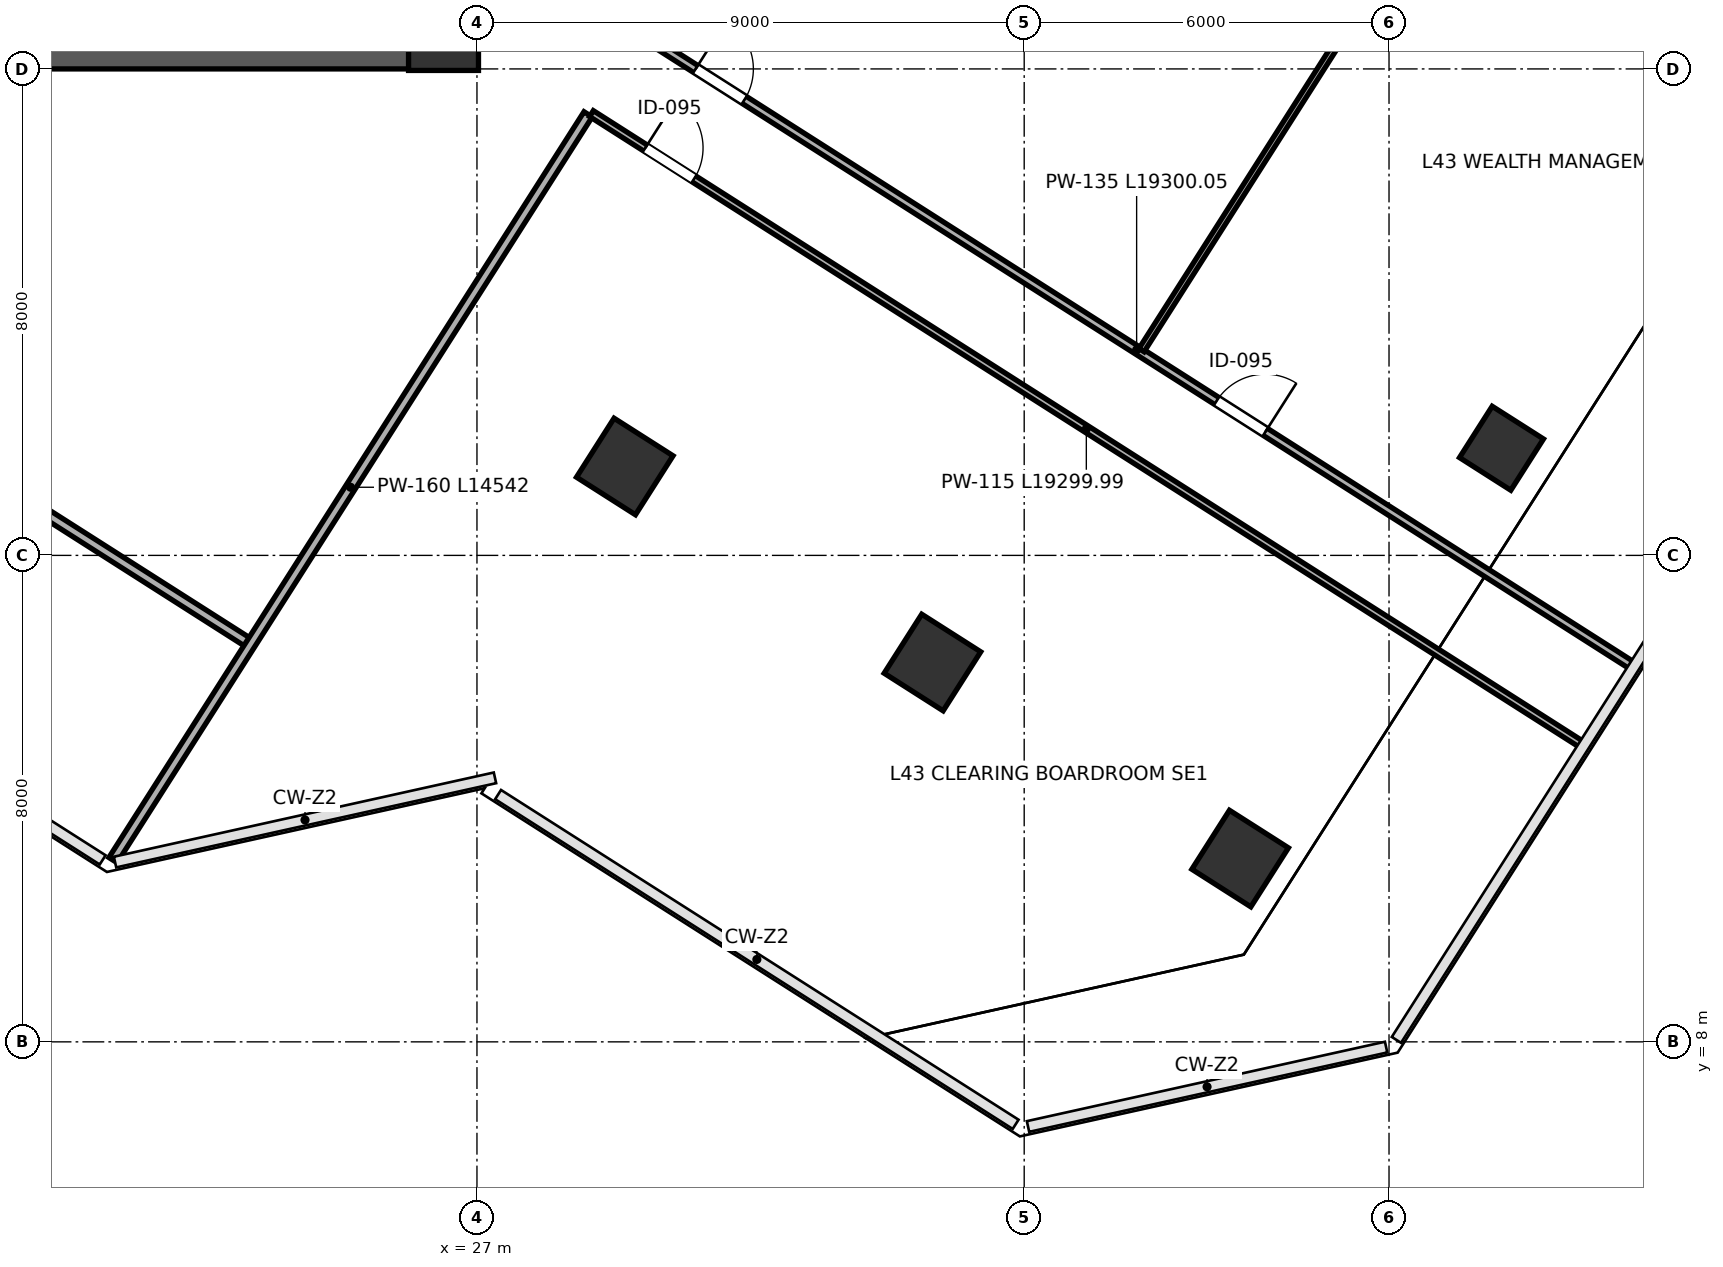
"""IFC4 building model, lengths in metres.
Left out: names, types, materials, properties, quantities, classifications, styles, units other than length and angle.
Written with IfcOpenShell. Run it as: python <this file> out.ifc"""

import sys

from ifc_helpers import new_model, si_unit, direction, frame, frame_2d, origin, origin_2d, place, context, subcontext, project, spatial, rectangle, extrude, clip, halfspace, source, transform, mapped, element, fill, save


model = new_model("IFC4")
c1 = context("Model", 3, precision=1e-05, world=origin(), true_north=direction((0.0, 1.0)))
c2 = subcontext(c1, "Body", "Model", "MODEL_VIEW")
j1 = project(units=[si_unit("LENGTHUNIT", "METRE"), si_unit("PLANEANGLEUNIT", "RADIAN")], contexts=[c1])
p1 = place(None, origin())
s1 = spatial("IfcSite", under=j1, at=p1, CompositionType="ELEMENT")
p2 = place(p1, origin())
s2 = spatial("IfcBuilding", under=s1, at=p2, CompositionType="ELEMENT")
p3 = place(p2, frame((0.0, 0.0, 191.8)))
s3 = spatial("IfcBuildingStorey", under=s2, at=p3, CompositionType="ELEMENT", Elevation=191.8)
m1 = source(origin(), c2, "Body", "SweptSolid", [
    extrude(rectangle(XDim=1.15, YDim=1.15, at=origin_2d()), origin(), (0.0, 0.0, 1.0), 4.198),
])
p4 = place(p3, frame((26.45, 24.55, 0.001), z_axis=(0.0, 0.0, 1.0), x_axis=(1.0, 0.0, 0.0)))
e1 = element("IfcColumn", 1, at=p4, inside=s3, PredefinedType="COLUMN", context=c2, shape_type="MappedRepresentation", body=[
    mapped(m1, transform((0.0, 0.0, 0.0), scale=1.0)),
])
p5 = place(p3, frame((29.431, 17.462, 0.0), z_axis=(-0.150609091116, -0.077911131198, 0.985518522053), x_axis=(0.082803161903, 0.992392481711, 0.091108718698)))
e2 = element("IfcColumn", 2, at=p5, inside=s3, PredefinedType="COLUMN", context=c2, shape_type="Clipping", body=[
    clip(clip(extrude(rectangle(XDim=1.15, YDim=1.15, at=origin_2d()), origin(), (0.0, 0.0, 1.0), 4.262), halfspace(frame((0.0, 0.0, 0.137), z_axis=(0.0, 0.0, -1.0), x_axis=(1.0, 0.0, 0.0)), False)), halfspace(frame((0.0, 0.0, 4.125), z_axis=(0.0, 0.0, 1.0), x_axis=(1.0, 0.0, 0.0)), False)),
])
p6 = place(p3, frame((34.491, 14.238, 0.0), z_axis=(-0.182696206841, -0.127615340511, 0.974851999471), x_axis=(-0.053558466448, 0.991359707094, 0.119738973699)))
e3 = element("IfcColumn", 3, at=p6, inside=s3, PredefinedType="COLUMN", context=c2, shape_type="Clipping", body=[
    clip(clip(extrude(rectangle(XDim=1.15, YDim=1.15, at=origin_2d()), origin(), (0.0, 0.0, 1.0), 4.308), halfspace(frame((0.0, 0.0, 0.182), z_axis=(0.0, 0.0, -1.0), x_axis=(1.0, 0.0, 0.0)), False)), halfspace(frame((0.0, 0.0, 4.126), z_axis=(0.0, 0.0, 1.0), x_axis=(1.0, 0.0, 0.0)), False)),
])
p7 = place(p3, frame((39.552, 11.014, 0.0), z_axis=(-0.213406469834, -0.175585480285, 0.961055366639), x_axis=(-0.137104351664, 0.979364247666, 0.148485915657)))
e4 = element("IfcColumn", 4, at=p7, inside=s3, PredefinedType="COLUMN", context=c2, shape_type="Clipping", body=[
    clip(clip(extrude(rectangle(XDim=1.15, YDim=1.15, at=origin_2d()), origin(), (0.0, 0.0, 1.0), 4.37), halfspace(frame((0.0, 0.0, 0.229), z_axis=(0.0, 0.0, -1.0), x_axis=(1.0, 0.0, 0.0)), False)), halfspace(frame((0.0, 0.0, 4.141), z_axis=(0.0, 0.0, 1.0), x_axis=(1.0, 0.0, 0.0)), False)),
])
p8 = place(p3, frame((43.85, 17.762, 0.0), z_axis=(-0.147452651765, -0.22070260078, 0.964130736724), x_axis=(-0.413499326518, 0.899266078661, 0.142614258542)))
e5 = element("IfcColumn", 5, at=p8, inside=s3, PredefinedType="COLUMN", context=c2, shape_type="Clipping", body=[
    clip(clip(extrude(rectangle(XDim=1.0, YDim=1.0, at=origin_2d()), origin(), (0.0, 0.0, 1.0), 4.356), halfspace(frame((0.0, 0.0, 0.191), z_axis=(0.0, 0.0, -1.0), x_axis=(1.0, 0.0, 0.0)), False)), halfspace(frame((0.0, 0.0, 4.165), z_axis=(0.0, 0.0, 1.0), x_axis=(1.0, 0.0, 0.0)), False)),
])
p9 = place(p3, frame((9.0, 24.225, 0.0), z_axis=(0.0, 0.0, 1.0), x_axis=(1.0, 0.0, 0.0)))
e6 = element("IfcWall", 6, at=p9, inside=s3, PredefinedType="SHEAR", context=c2, shape_type="SweptSolid", body=[
    extrude(rectangle(XDim=18.0, YDim=0.45, at=frame_2d((9.0, 0.0))), origin(), (0.0, 0.0, 1.0), 3.96),
])
p10 = place(p3, frame((6.25, 25.389, 0.0), z_axis=(0.0, 0.0, 1.0), x_axis=(0.843390478307, -0.537301127024, 0.0)))
e7 = element("IfcWall", 7, at=p10, inside=s3, PredefinedType="PARTITIONING", context=c2, shape_type="SweptSolid", body=[
    extrude(rectangle(XDim=20.15, YDim=0.16, at=frame_2d((10.075, 0.0))), origin(), (0.0, 0.0, 1.0), 3.96),
])
p11 = place(p10, frame((0.65, 0.0, 0.0)))
e8 = element("IfcOpeningElement", 8, at=p11, cuts=e7, PredefinedType="OPENING", context=c2, shape_type="SweptSolid", body=[
    extrude(rectangle(XDim=0.95, YDim=2.15, at=frame_2d((0.475, 1.075))), frame((0.0, 0.09, 0.0), z_axis=(0.0, -1.0, 0.0), x_axis=(1.0, 0.0, 0.0)), (0.0, 0.0, 1.0), 0.18),
])
p12 = place(p3, frame((21.014, 10.988, 0.0), z_axis=(0.0, 0.0, 1.0), x_axis=(0.537301260837, 0.843390393058, 0.0)))
e9 = element("IfcWall", 9, at=p12, inside=s3, PredefinedType="PARTITIONING", context=c2, shape_type="SweptSolid", body=[
    extrude(rectangle(XDim=14.542, YDim=0.16, at=frame_2d((7.271, 0.0))), origin(), (0.0, 0.0, 1.0), 3.96),
])
p13 = place(p3, frame((29.71, 24.564, 0.0), z_axis=(0.0, 0.0, 1.0), x_axis=(0.843390003721, -0.537301871971, 0.0)))
e10 = element("IfcWall", 10, at=p13, inside=s3, PredefinedType="PARTITIONING", context=c2, shape_type="SweptSolid", body=[
    extrude(rectangle(XDim=19.3, YDim=0.135, at=frame_2d((9.65, 0.0))), origin(), (0.0, 0.0, 1.0), 3.96),
])
p14 = place(p13, frame((1.05, 0.0, 0.0)))
e11 = element("IfcOpeningElement", 11, at=p14, cuts=e10, PredefinedType="OPENING", context=c2, shape_type="SweptSolid", body=[
    extrude(rectangle(XDim=0.95, YDim=2.15, at=frame_2d((0.475, 1.075))), frame((0.0, 0.078, 0.0), z_axis=(0.0, -1.0, 0.0), x_axis=(1.0, 0.0, 0.0)), (0.0, 0.0, 1.0), 0.155),
])
p15 = place(p13, frame((11.21, 0.0, 0.0)))
e12 = element("IfcOpeningElement", 12, at=p15, cuts=e10, PredefinedType="OPENING", context=c2, shape_type="SweptSolid", body=[
    extrude(rectangle(XDim=0.95, YDim=2.15, at=frame_2d((0.475, 1.075))), frame((0.0, 0.078, 0.0), z_axis=(0.0, -1.0, 0.0), x_axis=(1.0, 0.0, 0.0)), (0.0, 0.0, 1.0), 0.155),
])
p16 = place(p3, frame((28.883, 23.265, 0.0), z_axis=(0.0, 0.0, 1.0), x_axis=(0.843390003721, -0.537301871971, 0.0)))
e13 = element("IfcWall", 13, at=p16, inside=s3, PredefinedType="PARTITIONING", context=c2, shape_type="SweptSolid", body=[
    extrude(rectangle(XDim=19.3, YDim=0.115, at=frame_2d((9.65, 0.0))), origin(), (0.0, 0.0, 1.0), 3.96),
])
p17 = place(p16, frame((1.05, 0.0, 0.0)))
e14 = element("IfcOpeningElement", 14, at=p17, cuts=e13, PredefinedType="OPENING", context=c2, shape_type="SweptSolid", body=[
    extrude(rectangle(XDim=0.95, YDim=2.15, at=frame_2d((0.475, 1.075))), frame((0.0, 0.067, 0.0), z_axis=(0.0, -1.0, 0.0), x_axis=(1.0, 0.0, 0.0)), (0.0, 0.0, 1.0), 0.135),
])
p18 = place(p3, frame((37.93, 19.375, 0.0), z_axis=(0.0, 0.0, 1.0), x_axis=(0.537293376795, 0.843395415717, 0.0)))
e15 = element("IfcWall", 15, at=p18, inside=s3, PredefinedType="PARTITIONING", context=c2, shape_type="SweptSolid", body=[
    extrude(rectangle(XDim=17.84, YDim=0.1, at=frame_2d((8.92, 0.0))), origin(), (0.0, 0.0, 1.0), 3.96),
])
m2 = source(origin(), c2, "Body", "SweptSolid", [
    extrude(rectangle(XDim=0.95, YDim=2.15, at=frame_2d((0.475, 1.075))), frame((0.0, 0.025, 0.0), z_axis=(0.0, -1.0, 0.0), x_axis=(1.0, 0.0, 0.0)), (0.0, 0.0, 1.0), 0.05),
])
p19 = place(p14, origin())
e16 = element("IfcDoor", 16, at=p19, inside=s3, OperationType="SINGLE_SWING_LEFT", PredefinedType="DOOR", context=c2, shape_type="MappedRepresentation", body=[
    mapped(m2, transform((0.0, 0.0, 0.0), scale=1.0)),
])
fill(e11, e16)
p20 = place(p15, origin())
e17 = element("IfcDoor", 17, at=p20, inside=s3, OperationType="SINGLE_SWING_RIGHT", PredefinedType="DOOR", context=c2, shape_type="MappedRepresentation", body=[
    mapped(m2, transform((0.0, 0.0, 0.0), scale=1.0)),
])
fill(e12, e17)
p21 = place(p17, origin())
e18 = element("IfcDoor", 18, at=p21, inside=s3, OperationType="SINGLE_SWING_LEFT", PredefinedType="DOOR", context=c2, shape_type="MappedRepresentation", body=[
    mapped(m2, transform((0.0, 0.0, 0.0), scale=1.0)),
])
fill(e14, e18)
save(model, sys.argv[1])
